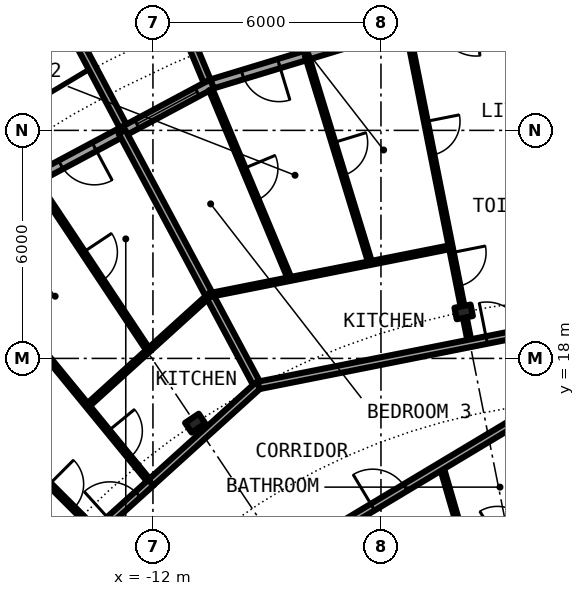
"""IFC4 building model, lengths in metres.
Left out: names, types, materials, properties, quantities, classifications, styles, units other than length and angle.
Written with IfcOpenShell. Run it as: python <this file> out.ifc"""

import sys

from ifc_helpers import new_model, si_unit, direction, frame, frame_2d, origin, origin_2d, place, context, subcontext, project, spatial, rectangle, i_section, extrude, element, fill, save


model = new_model("IFC4")
c1 = context("Model", 3, precision=1e-05, world=origin(), true_north=direction((0.0, 1.0)))
c2 = subcontext(c1, "Body", "Model", "MODEL_VIEW")
j1 = project(units=[si_unit("LENGTHUNIT", "METRE"), si_unit("PLANEANGLEUNIT", "RADIAN")], contexts=[c1])
p1 = place(None, origin())
s1 = spatial("IfcSite", under=j1, at=p1, CompositionType="ELEMENT")
p2 = place(p1, origin())
s2 = spatial("IfcBuilding", under=s1, at=p2, CompositionType="ELEMENT")
p3 = place(p2, frame((0.0, 0.0, 129.95)))
s3 = spatial("IfcBuildingStorey", under=s2, at=p3, CompositionType="ELEMENT", Elevation=129.95)
for number, where, z_axis, x_axis in (
    (1, (-3.824, 19.223, 0.0), (0.0, 0.0, 1.0), (-0.195, 0.981, 0.0)),
    (2, (-10.889, 16.297, 0.0), (0.0, 0.0, 1.0), (-0.556, 0.831, 0.0)),
):
    element("IfcColumn", number, at=place(p3, frame(where, z_axis=z_axis, x_axis=x_axis)), inside=s3, PredefinedType="COLUMN", context=c2, shape_type="SweptSolid", body=[
        extrude(i_section(OverallWidth=0.307, OverallDepth=0.432, WebThickness=0.021, FlangeThickness=0.04, FilletRadius=0.027, at=origin_2d()), origin(), (0.0, 0.0, 1.0), 3.05),
    ])
p4 = place(p3, frame((-5.326, 26.775, 0.0), z_axis=(0.0, 0.0, 1.0), x_axis=(-0.956965678721, -0.290201119486, 0.0)))
e3 = element("IfcWall", 3, at=p4, inside=s3, PredefinedType="SOLIDWALL", context=c2, shape_type="SweptSolid", body=[
    extrude(rectangle(XDim=5.351, YDim=0.25, at=frame_2d((2.676, 0.0))), origin(), (0.0, 0.0, 1.0), 2.7),
])
p5 = place(p4, frame((0.441, 0.0, 0.3)))
e4 = element("IfcOpeningElement", 4, at=p5, cuts=e3, PredefinedType="OPENING", context=c2, shape_type="SweptSolid", body=[
    extrude(rectangle(XDim=1.8, YDim=2.1, at=frame_2d((0.9, 1.05))), frame((0.0, 0.135, 0.0), z_axis=(0.0, -1.0, 0.0), x_axis=(1.0, 0.0, 0.0)), (0.0, 0.0, 1.0), 0.27),
])
p6 = place(p4, frame((3.51, 0.0, 0.0)))
e5 = element("IfcOpeningElement", 5, at=p6, cuts=e3, PredefinedType="OPENING", context=c2, shape_type="SweptSolid", body=[
    extrude(rectangle(XDim=1.0, YDim=2.2, at=frame_2d((0.5, 1.1))), frame((0.0, 0.135, 0.0), z_axis=(0.0, -1.0, 0.0), x_axis=(1.0, 0.0, 0.0)), (0.0, 0.0, 1.0), 0.27),
])
p7 = place(p3, frame((-10.447, 25.222, 0.0), z_axis=(0.0, 0.0, 1.0), x_axis=(-0.881915646801, -0.471407246368, 0.0)))
e6 = element("IfcWall", 6, at=p7, inside=s3, PredefinedType="SOLIDWALL", context=c2, shape_type="SweptSolid", body=[
    extrude(rectangle(XDim=5.352, YDim=0.25, at=frame_2d((2.676, 0.0))), origin(), (0.0, 0.0, 1.0), 2.7),
])
p8 = place(p7, frame((0.441, 0.0, 0.3)))
e7 = element("IfcOpeningElement", 7, at=p8, cuts=e6, PredefinedType="OPENING", context=c2, shape_type="SweptSolid", body=[
    extrude(rectangle(XDim=1.8, YDim=2.1, at=frame_2d((0.9, 1.05))), frame((0.0, 0.135, 0.0), z_axis=(0.0, -1.0, 0.0), x_axis=(1.0, 0.0, 0.0)), (0.0, 0.0, 1.0), 0.27),
])
p9 = place(p7, frame((3.51, 0.0, 0.0)))
e8 = element("IfcOpeningElement", 8, at=p9, cuts=e6, PredefinedType="OPENING", context=c2, shape_type="SweptSolid", body=[
    extrude(rectangle(XDim=1.0, YDim=2.2, at=frame_2d((0.5, 1.1))), frame((0.0, 0.135, 0.0), z_axis=(0.0, -1.0, 0.0), x_axis=(1.0, 0.0, 0.0)), (0.0, 0.0, 1.0), 0.27),
])
p10 = place(p3, frame((-10.575, 25.295, -0.03), z_axis=(0.0, 0.0, 1.0), x_axis=(-0.385697364644, 0.922625353492, 0.0)))
e9 = element("IfcWall", 9, at=p10, inside=s3, PredefinedType="SOLIDWALL", context=c2, shape_type="SweptSolid", body=[
    extrude(rectangle(XDim=2.883, YDim=0.2, at=frame_2d((1.442, 0.0))), origin(), (0.0, 0.0, 1.0), 2.73),
])
p11 = place(p3, frame((-12.787, 24.113, -0.03), z_axis=(0.0, 0.0, 1.0), x_axis=(-0.468365282436, 0.883534924159, 0.0)))
e10 = element("IfcWall", 10, at=p11, inside=s3, PredefinedType="SOLIDWALL", context=c2, shape_type="SweptSolid", body=[
    extrude(rectangle(XDim=3.006, YDim=0.2, at=frame_2d((1.503, 0.0))), origin(), (0.0, 0.0, 1.0), 2.73),
])
p12 = place(p3, frame((-17.221, 21.022, 0.0), z_axis=(0.0, 0.0, 1.0), x_axis=(0.633735868108, -0.773549513266, 0.0)))
e11 = element("IfcWall", 11, at=p12, inside=s3, PredefinedType="PARTITIONING", context=c2, shape_type="SweptSolid", body=[
    extrude(rectangle(XDim=8.139, YDim=0.1, at=frame_2d((4.069, 0.0))), origin(), (0.0, 0.0, 1.0), 2.7),
])
p13 = place(p12, frame((6.378, 0.0, 0.0)))
e12 = element("IfcOpeningElement", 12, at=p13, cuts=e11, PredefinedType="OPENING", context=c2, shape_type="SweptSolid", body=[
    extrude(rectangle(XDim=0.9, YDim=2.3, at=frame_2d((0.45, 1.15))), frame((0.0, 0.06, 0.0), z_axis=(0.0, -1.0, 0.0), x_axis=(1.0, 0.0, 0.0)), (0.0, 0.0, 1.0), 0.12),
])
p14 = place(p12, frame((2.308, 0.0, 0.0)))
e13 = element("IfcOpeningElement", 13, at=p14, cuts=e11, PredefinedType="OPENING", context=c2, shape_type="SweptSolid", body=[
    extrude(rectangle(XDim=0.9, YDim=2.3, at=frame_2d((0.45, 1.15))), frame((0.0, 0.06, 0.0), z_axis=(0.0, -1.0, 0.0), x_axis=(1.0, 0.0, 0.0)), (0.0, 0.0, 1.0), 0.12),
])
p15 = place(p3, frame((-15.333, 15.297, 0.0), z_axis=(0.0, 0.0, 1.0), x_axis=(0.707851299421, -0.706361478217, 0.0)))
e14 = element("IfcWall", 14, at=p15, inside=s3, PredefinedType="PARTITIONING", context=c2, shape_type="SweptSolid", body=[
    extrude(rectangle(XDim=2.622, YDim=0.1, at=frame_2d((1.311, 0.0))), origin(), (0.0, 0.0, 1.0), 2.7),
])
p16 = place(p15, frame((0.861, 0.0, 0.0)))
e15 = element("IfcOpeningElement", 15, at=p16, cuts=e14, PredefinedType="OPENING", context=c2, shape_type="SweptSolid", body=[
    extrude(rectangle(XDim=0.9, YDim=2.3, at=frame_2d((0.45, 1.15))), frame((0.0, 0.06, 0.0), z_axis=(0.0, -1.0, 0.0), x_axis=(1.0, 0.0, 0.0)), (0.0, 0.0, 1.0), 0.12),
])
p17 = place(p3, frame((-15.054, 22.624, 0.0), z_axis=(0.0, 0.0, 1.0), x_axis=(0.553913391217, -0.832574294, 0.0)))
e16 = element("IfcWall", 16, at=p17, inside=s3, PredefinedType="PARTITIONING", context=c2, shape_type="SweptSolid", body=[
    extrude(rectangle(XDim=5.301, YDim=0.1, at=frame_2d((2.65, 0.0))), origin(), (0.0, 0.0, 1.0), 2.7),
])
p18 = place(p17, frame((2.2, 0.0, 0.0)))
e17 = element("IfcOpeningElement", 17, at=p18, cuts=e16, PredefinedType="OPENING", context=c2, shape_type="SweptSolid", body=[
    extrude(rectangle(XDim=0.9, YDim=2.3, at=frame_2d((0.45, 1.15))), frame((0.0, 0.06, 0.0), z_axis=(0.0, -1.0, 0.0), x_axis=(1.0, 0.0, 0.0)), (0.0, 0.0, 1.0), 0.12),
])
p19 = place(p3, frame((-12.815, 23.963, 0.0), z_axis=(0.0, 0.0, 1.0), x_axis=(0.471506520577, -0.881862574925, 0.0)))
e18 = element("IfcWall", 18, at=p19, inside=s3, PredefinedType="PARTITIONING", context=c2, shape_type="SweptSolid", body=[
    extrude(rectangle(XDim=7.574, YDim=0.2, at=frame_2d((3.787, 0.0))), origin(), (0.0, 0.0, 1.0), 2.7),
])
p20 = place(p3, frame((-10.479, 25.073, 0.0), z_axis=(0.0, 0.0, 1.0), x_axis=(0.385542476694, -0.922690088093, 0.0)))
e19 = element("IfcWall", 19, at=p20, inside=s3, PredefinedType="PARTITIONING", context=c2, shape_type="SweptSolid", body=[
    extrude(rectangle(XDim=5.403, YDim=0.1, at=frame_2d((2.701, 0.0))), origin(), (0.0, 0.0, 1.0), 2.7),
])
p21 = place(p20, frame((2.251, 0.0, 0.0)))
e20 = element("IfcOpeningElement", 20, at=p21, cuts=e19, PredefinedType="OPENING", context=c2, shape_type="SweptSolid", body=[
    extrude(rectangle(XDim=0.9, YDim=2.3, at=frame_2d((0.45, 1.15))), frame((0.0, 0.06, 0.0), z_axis=(0.0, -1.0, 0.0), x_axis=(1.0, 0.0, 0.0)), (0.0, 0.0, 1.0), 0.12),
])
p22 = place(p3, frame((-7.956, 25.984, 0.0), z_axis=(0.0, 0.0, 1.0), x_axis=(0.292722228482, -0.956197519842, 0.0)))
e21 = element("IfcWall", 21, at=p22, inside=s3, PredefinedType="PARTITIONING", context=c2, shape_type="SweptSolid", body=[
    extrude(rectangle(XDim=5.726, YDim=0.1, at=frame_2d((2.863, 0.0))), origin(), (0.0, 0.0, 1.0), 2.7),
])
p23 = place(p22, frame((2.413, 0.0, 0.0)))
e22 = element("IfcOpeningElement", 22, at=p23, cuts=e21, PredefinedType="OPENING", context=c2, shape_type="SweptSolid", body=[
    extrude(rectangle(XDim=0.9, YDim=2.3, at=frame_2d((0.45, 1.15))), frame((0.0, 0.06, 0.0), z_axis=(0.0, -1.0, 0.0), x_axis=(1.0, 0.0, 0.0)), (0.0, 0.0, 1.0), 0.12),
])
p24 = place(p3, frame((-5.301, 26.653, 0.0), z_axis=(0.0, 0.0, 1.0), x_axis=(0.194999559373, -0.98080332985, 0.0)))
e23 = element("IfcWall", 23, at=p24, inside=s3, PredefinedType="PARTITIONING", context=c2, shape_type="SweptSolid", body=[
    extrude(rectangle(XDim=7.359, YDim=0.1, at=frame_2d((3.68, 0.0))), origin(), (0.0, 0.0, 1.0), 2.7),
])
p25 = place(p24, frame((5.985, 0.0, 0.0)))
e24 = element("IfcOpeningElement", 24, at=p25, cuts=e23, PredefinedType="OPENING", context=c2, shape_type="SweptSolid", body=[
    extrude(rectangle(XDim=0.9, YDim=2.3, at=frame_2d((0.45, 1.15))), frame((0.0, 0.06, 0.0), z_axis=(0.0, -1.0, 0.0), x_axis=(1.0, 0.0, 0.0)), (0.0, 0.0, 1.0), 0.12),
])
p26 = place(p24, frame((2.467, 0.0, 0.0)))
e25 = element("IfcOpeningElement", 25, at=p26, cuts=e23, PredefinedType="OPENING", context=c2, shape_type="SweptSolid", body=[
    extrude(rectangle(XDim=0.9, YDim=2.3, at=frame_2d((0.45, 1.15))), frame((0.0, 0.06, 0.0), z_axis=(0.0, -1.0, 0.0), x_axis=(1.0, 0.0, 0.0)), (0.0, 0.0, 1.0), 0.12),
])
p27 = place(p3, frame((-4.411, 15.168, 0.0), z_axis=(0.0, 0.0, 1.0), x_axis=(0.279201466266, -0.960232545395, 0.0)))
e26 = element("IfcWall", 26, at=p27, inside=s3, PredefinedType="PARTITIONING", context=c2, shape_type="SweptSolid", body=[
    extrude(rectangle(XDim=2.524, YDim=0.1, at=frame_2d((1.262, 0.0))), origin(), (0.0, 0.0, 1.0), 2.7),
])
p28 = place(p3, frame((-3.781, 19.012, 0.0), z_axis=(0.0, 0.0, 1.0), x_axis=(0.194396175087, -0.980923099489, 0.0)))
e27 = element("IfcWall", 27, at=p28, inside=s3, PredefinedType="PARTITIONING", context=c2, shape_type="SweptSolid", body=[
    extrude(rectangle(XDim=0.628, YDim=0.1, at=frame_2d((0.314, 0.0))), origin(), (0.0, 0.0, 1.0), 2.7),
])
p29 = place(p3, frame((-3.706, 12.744, 0.0), z_axis=(0.0, 0.0, 1.0), x_axis=(0.857524856518, 0.514442533674, 0.0)))
e28 = element("IfcWall", 28, at=p29, inside=s3, PredefinedType="PARTITIONING", context=c2, shape_type="SweptSolid", body=[
    extrude(rectangle(XDim=2.698, YDim=0.1, at=frame_2d((1.349, 0.0))), origin(), (0.0, 0.0, 1.0), 2.7),
])
p30 = place(p29, frame((0.899, 0.0, 0.0)))
e29 = element("IfcOpeningElement", 29, at=p30, cuts=e28, PredefinedType="OPENING", context=c2, shape_type="SweptSolid", body=[
    extrude(rectangle(XDim=0.9, YDim=2.3, at=frame_2d((0.45, 1.15))), frame((0.0, 0.06, 0.0), z_axis=(0.0, -1.0, 0.0), x_axis=(1.0, 0.0, 0.0)), (0.0, 0.0, 1.0), 0.12),
])
p31 = place(p3, frame((-12.675, 10.215, 0.0), z_axis=(0.0, 0.0, 1.0), x_axis=(0.85772761283, 0.514104407867, 0.0)))
e30 = element("IfcWall", 30, at=p31, inside=s3, PredefinedType="PARTITIONING", context=c2, shape_type="SweptSolid", body=[
    extrude(rectangle(XDim=12.846, YDim=0.2, at=frame_2d((6.423, 0.0))), origin(), (0.0, 0.0, 1.0), 2.7),
])
p32 = place(p31, frame((7.529, 0.0, 0.0)))
e31 = element("IfcOpeningElement", 31, at=p32, cuts=e30, PredefinedType="OPENING", context=c2, shape_type="SweptSolid", body=[
    extrude(rectangle(XDim=1.0, YDim=2.3, at=frame_2d((0.5, 1.15))), frame((0.0, 0.11, 0.0), z_axis=(0.0, -1.0, 0.0), x_axis=(1.0, 0.0, 0.0)), (0.0, 0.0, 1.0), 0.22),
])
p33 = place(p3, frame((-9.239, 17.286, 0.0), z_axis=(0.0, 0.0, 1.0), x_axis=(0.98077905287, 0.195121627328, 0.0)))
e32 = element("IfcWall", 32, at=p33, inside=s3, PredefinedType="PARTITIONING", context=c2, shape_type="SweptSolid", body=[
    extrude(rectangle(XDim=11.379, YDim=0.2, at=frame_2d((5.689, 0.0))), origin(), (0.0, 0.0, 1.0), 2.39),
])
p34 = place(p33, frame((6.138, 0.0, 0.0)))
e33 = element("IfcOpeningElement", 33, at=p34, cuts=e32, PredefinedType="OPENING", context=c2, shape_type="SweptSolid", body=[
    extrude(rectangle(XDim=1.0, YDim=2.3, at=frame_2d((0.5, 1.15))), frame((0.0, 0.11, 0.0), z_axis=(0.0, -1.0, 0.0), x_axis=(1.0, 0.0, 0.0)), (0.0, 0.0, 1.0), 0.22),
])
p35 = place(p3, frame((-13.474, 13.448, 0.0), z_axis=(0.0, 0.0, 1.0), x_axis=(0.742096578776, 0.670292971595, 0.0)))
e34 = element("IfcWall", 34, at=p35, inside=s3, PredefinedType="PARTITIONING", context=c2, shape_type="SweptSolid", body=[
    extrude(rectangle(XDim=1.938, YDim=0.2, at=frame_2d((0.969, 0.0))), origin(), (0.0, 0.0, 1.0), 2.7),
])
p36 = place(p35, frame((0.453, 0.0, 0.0)))
e35 = element("IfcOpeningElement", 35, at=p36, cuts=e34, PredefinedType="OPENING", context=c2, shape_type="SweptSolid", body=[
    extrude(rectangle(XDim=1.0, YDim=2.3, at=frame_2d((0.5, 1.15))), frame((0.0, 0.11, 0.0), z_axis=(0.0, -1.0, 0.0), x_axis=(1.0, 0.0, 0.0)), (0.0, 0.0, 1.0), 0.22),
])
p37 = place(p3, frame((-12.056, 14.731, 0.0), z_axis=(0.0, 0.0, 1.0), x_axis=(0.74113339149, 0.671357800296, 0.0)))
e36 = element("IfcWall", 36, at=p37, inside=s3, PredefinedType="PARTITIONING", context=c2, shape_type="SweptSolid", body=[
    extrude(rectangle(XDim=3.81, YDim=0.2, at=frame_2d((1.905, 0.0))), origin(), (0.0, 0.0, 1.0), 2.7),
])
p38 = place(p3, frame((-10.513, 19.667, 0.0), z_axis=(0.0, 0.0, 1.0), x_axis=(0.980783231687, 0.195100621324, 0.0)))
e37 = element("IfcWall", 37, at=p38, inside=s3, PredefinedType="PARTITIONING", context=c2, shape_type="SweptSolid", body=[
    extrude(rectangle(XDim=6.473, YDim=0.1, at=frame_2d((3.237, 0.0))), origin(), (0.0, 0.0, 1.0), 2.7),
])
p39 = place(p3, frame((-13.724, 16.755, 0.0), z_axis=(0.0, 0.0, 1.0), x_axis=(0.741022791884, 0.671479874537, 0.0)))
e38 = element("IfcWall", 38, at=p39, inside=s3, PredefinedType="PARTITIONING", context=c2, shape_type="SweptSolid", body=[
    extrude(rectangle(XDim=4.343, YDim=0.1, at=frame_2d((2.171, 0.0))), origin(), (0.0, 0.0, 1.0), 2.7),
])
p40 = place(p6, origin())
e39 = element("IfcDoor", 39, at=p40, inside=s3, OperationType="SINGLE_SWING_LEFT", PredefinedType="DOOR", context=c2, shape_type="SweptSolid", body=[
    extrude(rectangle(XDim=1.0, YDim=2.2, at=frame_2d((0.5, 1.1))), frame((0.0, 0.025, 0.0), z_axis=(0.0, -1.0, 0.0), x_axis=(1.0, 0.0, 0.0)), (0.0, 0.0, 1.0), 0.05),
])
fill(e5, e39)
p41 = place(p8, origin())
e40 = element("IfcWindow", 40, at=p41, inside=s3, PartitioningType="SINGLE_PANEL", PredefinedType="WINDOW", context=c2, shape_type="SweptSolid", body=[
    extrude(rectangle(XDim=1.8, YDim=2.1, at=frame_2d((0.9, 1.05))), frame((0.0, 0.03, 0.0), z_axis=(0.0, -1.0, 0.0), x_axis=(1.0, 0.0, 0.0)), (0.0, 0.0, 1.0), 0.06),
])
fill(e7, e40)
p42 = place(p9, origin())
e41 = element("IfcDoor", 41, at=p42, inside=s3, OperationType="SINGLE_SWING_LEFT", PredefinedType="DOOR", context=c2, shape_type="SweptSolid", body=[
    extrude(rectangle(XDim=1.0, YDim=2.2, at=frame_2d((0.5, 1.1))), frame((0.0, 0.025, 0.0), z_axis=(0.0, -1.0, 0.0), x_axis=(1.0, 0.0, 0.0)), (0.0, 0.0, 1.0), 0.05),
])
fill(e8, e41)
p43 = place(p34, origin())
e42 = element("IfcDoor", 42, at=p43, inside=s3, OperationType="SINGLE_SWING_RIGHT", PredefinedType="DOOR", context=c2, shape_type="SweptSolid", body=[
    extrude(rectangle(XDim=1.0, YDim=2.3, at=frame_2d((0.5, 1.15))), frame((0.0, 0.025, 0.0), z_axis=(0.0, -1.0, 0.0), x_axis=(1.0, 0.0, 0.0)), (0.0, 0.0, 1.0), 0.05),
])
fill(e33, e42)
p44 = place(p25, origin())
e43 = element("IfcDoor", 43, at=p44, inside=s3, OperationType="SINGLE_SWING_RIGHT", PredefinedType="DOOR", context=c2, shape_type="SweptSolid", body=[
    extrude(rectangle(XDim=0.9, YDim=2.3, at=frame_2d((0.45, 1.15))), frame((0.0, 0.025, 0.0), z_axis=(0.0, -1.0, 0.0), x_axis=(1.0, 0.0, 0.0)), (0.0, 0.0, 1.0), 0.05),
])
fill(e24, e43)
p45 = place(p26, origin())
e44 = element("IfcDoor", 44, at=p45, inside=s3, OperationType="SINGLE_SWING_LEFT", PredefinedType="DOOR", context=c2, shape_type="SweptSolid", body=[
    extrude(rectangle(XDim=0.9, YDim=2.3, at=frame_2d((0.45, 1.15))), frame((0.0, 0.025, 0.0), z_axis=(0.0, -1.0, 0.0), x_axis=(1.0, 0.0, 0.0)), (0.0, 0.0, 1.0), 0.05),
])
fill(e25, e44)
p46 = place(p23, origin())
e45 = element("IfcDoor", 45, at=p46, inside=s3, OperationType="SINGLE_SWING_RIGHT", PredefinedType="DOOR", context=c2, shape_type="SweptSolid", body=[
    extrude(rectangle(XDim=0.9, YDim=2.3, at=frame_2d((0.45, 1.15))), frame((0.0, 0.025, 0.0), z_axis=(0.0, -1.0, 0.0), x_axis=(1.0, 0.0, 0.0)), (0.0, 0.0, 1.0), 0.05),
])
fill(e22, e45)
p47 = place(p21, origin())
e46 = element("IfcDoor", 46, at=p47, inside=s3, OperationType="SINGLE_SWING_RIGHT", PredefinedType="DOOR", context=c2, shape_type="SweptSolid", body=[
    extrude(rectangle(XDim=0.9, YDim=2.3, at=frame_2d((0.45, 1.15))), frame((0.0, 0.025, 0.0), z_axis=(0.0, -1.0, 0.0), x_axis=(1.0, 0.0, 0.0)), (0.0, 0.0, 1.0), 0.05),
])
fill(e20, e46)
p48 = place(p36, origin())
e47 = element("IfcDoor", 47, at=p48, inside=s3, OperationType="SINGLE_SWING_LEFT", PredefinedType="DOOR", context=c2, shape_type="SweptSolid", body=[
    extrude(rectangle(XDim=1.0, YDim=2.3, at=frame_2d((0.5, 1.15))), frame((0.0, 0.025, 0.0), z_axis=(0.0, -1.0, 0.0), x_axis=(1.0, 0.0, 0.0)), (0.0, 0.0, 1.0), 0.05),
])
fill(e35, e47)
p49 = place(p16, origin())
e48 = element("IfcDoor", 48, at=p49, inside=s3, OperationType="SINGLE_SWING_RIGHT", PredefinedType="DOOR", context=c2, shape_type="SweptSolid", body=[
    extrude(rectangle(XDim=0.9, YDim=2.3, at=frame_2d((0.45, 1.15))), frame((0.0, 0.025, 0.0), z_axis=(0.0, -1.0, 0.0), x_axis=(1.0, 0.0, 0.0)), (0.0, 0.0, 1.0), 0.05),
])
fill(e15, e48)
p50 = place(p13, origin())
e49 = element("IfcDoor", 49, at=p50, inside=s3, OperationType="SINGLE_SWING_RIGHT", PredefinedType="DOOR", context=c2, shape_type="SweptSolid", body=[
    extrude(rectangle(XDim=0.9, YDim=2.3, at=frame_2d((0.45, 1.15))), frame((0.0, 0.025, 0.0), z_axis=(0.0, -1.0, 0.0), x_axis=(1.0, 0.0, 0.0)), (0.0, 0.0, 1.0), 0.05),
])
fill(e12, e49)
p51 = place(p18, origin())
e50 = element("IfcDoor", 50, at=p51, inside=s3, OperationType="SINGLE_SWING_LEFT", PredefinedType="DOOR", context=c2, shape_type="SweptSolid", body=[
    extrude(rectangle(XDim=0.9, YDim=2.3, at=frame_2d((0.45, 1.15))), frame((0.0, 0.025, 0.0), z_axis=(0.0, -1.0, 0.0), x_axis=(1.0, 0.0, 0.0)), (0.0, 0.0, 1.0), 0.05),
])
fill(e17, e50)
p52 = place(p32, origin())
e51 = element("IfcDoor", 51, at=p52, inside=s3, OperationType="SINGLE_SWING_RIGHT", PredefinedType="DOOR", context=c2, shape_type="SweptSolid", body=[
    extrude(rectangle(XDim=1.0, YDim=2.3, at=frame_2d((0.5, 1.15))), frame((0.0, 0.025, 0.0), z_axis=(0.0, -1.0, 0.0), x_axis=(1.0, 0.0, 0.0)), (0.0, 0.0, 1.0), 0.05),
])
fill(e31, e51)
save(model, sys.argv[1])
